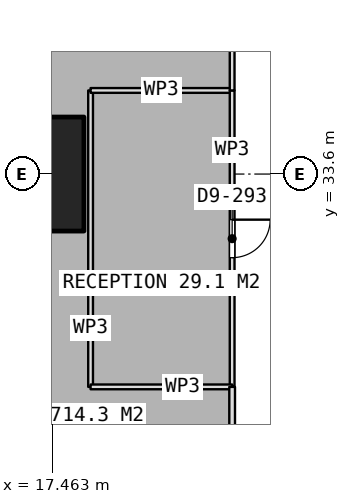
"""IFC4 building model, lengths in metres.
Left out: names, types, materials, properties, quantities, classifications, styles, units other than length and angle.
Written with IfcOpenShell. Run it as: python <this file> out.ifc"""

import sys

from ifc_helpers import new_model, si_unit, direction, frame, frame_2d, origin, origin_2d, place, context, subcontext, project, spatial, rectangle, extrude, element, fill, save


model = new_model("IFC4")
c1 = context("Model", 3, precision=1e-05, world=origin(), true_north=direction((0.0, 1.0)))
c2 = subcontext(c1, "Body", "Model", "MODEL_VIEW")
j1 = project(units=[si_unit("LENGTHUNIT", "METRE"), si_unit("PLANEANGLEUNIT", "RADIAN")], contexts=[c1])
p1 = place(None, origin())
s1 = spatial("IfcSite", under=j1, at=p1, CompositionType="ELEMENT")
p2 = place(p1, origin())
s2 = spatial("IfcBuilding", under=s1, at=p2, CompositionType="ELEMENT")
p3 = place(p2, frame((0.0, 0.0, 81.65)))
s3 = spatial("IfcBuildingStorey", under=s2, at=p3, CompositionType="ELEMENT", Elevation=81.65)
p4 = place(p3, frame((16.8, 33.6, 0.0), z_axis=(0.0, 0.0, 1.0), x_axis=(1.0, 0.0, 0.0)))
e1 = element("IfcColumn", 1, at=p4, inside=s3, PredefinedType="COLUMN", context=c2, shape_type="SweptSolid", body=[
    extrude(rectangle(XDim=3.0, YDim=3.0, at=origin_2d()), origin(), (0.0, 0.0, 1.0), 3.75),
])
p5 = place(p3, frame((18.475, 28.0, 0.0), z_axis=(0.0, 0.0, 1.0), x_axis=(0.0, 1.0, 0.0)))
e2 = element("IfcWall", 2, at=p5, inside=s3, PredefinedType="PARTITIONING", context=c2, shape_type="SweptSolid", body=[
    extrude(rectangle(XDim=7.8, YDim=0.125, at=frame_2d((3.9, 0.0))), origin(), (0.0, 0.0, 1.0), 3.4),
])
p6 = place(p3, frame((18.475, 35.8, 0.0), z_axis=(0.0, 0.0, 1.0), x_axis=(1.0, 0.0, 0.0)))
e3 = element("IfcWall", 3, at=p6, inside=s3, PredefinedType="PARTITIONING", context=c2, shape_type="SweptSolid", body=[
    extrude(rectangle(XDim=3.725, YDim=0.125, at=frame_2d((1.862, 0.0))), origin(), (0.0, 0.0, 1.0), 3.4),
])
p7 = place(p3, frame((22.2, 35.8, 0.0), z_axis=(0.0, 0.0, 1.0), x_axis=(0.0, -1.0, 0.0)))
e4 = element("IfcWall", 4, at=p7, inside=s3, PredefinedType="PARTITIONING", context=c2, shape_type="SweptSolid", body=[
    extrude(rectangle(XDim=7.8, YDim=0.125, at=frame_2d((3.9, 0.0))), origin(), (0.0, 0.0, 1.0), 3.4),
])
p8 = place(p7, frame((3.4, 0.0, 0.0)))
e5 = element("IfcOpeningElement", 5, at=p8, cuts=e4, PredefinedType="OPENING", context=c2, shape_type="SweptSolid", body=[
    extrude(rectangle(XDim=1.0, YDim=2.1, at=frame_2d((0.5, 1.05))), frame((0.0, 0.073, 0.0), z_axis=(0.0, -1.0, 0.0), x_axis=(1.0, 0.0, 0.0)), (0.0, 0.0, 1.0), 0.145),
])
p9 = place(p3, frame((22.2, 28.0, 0.0), z_axis=(0.0, 0.0, 1.0), x_axis=(-1.0, 0.0, 0.0)))
e6 = element("IfcWall", 6, at=p9, inside=s3, PredefinedType="PARTITIONING", context=c2, shape_type="SweptSolid", body=[
    extrude(rectangle(XDim=3.725, YDim=0.125, at=frame_2d((1.862, 0.0))), origin(), (0.0, 0.0, 1.0), 3.4),
])
p10 = place(p3, frame((22.2, 39.1, 0.0), z_axis=(0.0, 0.0, 1.0), x_axis=(0.0, -1.0, 0.0)))
e7 = element("IfcWall", 7, at=p10, inside=s3, PredefinedType="PARTITIONING", context=c2, shape_type="SweptSolid", body=[
    extrude(rectangle(XDim=3.3, YDim=0.125, at=frame_2d((1.65, 0.0))), origin(), (0.0, 0.0, 1.0), 3.4),
])
p11 = place(p3, frame((22.2, 28.0, 0.0), z_axis=(0.0, 0.0, 1.0), x_axis=(0.0, -1.0, 0.0)))
e8 = element("IfcWall", 8, at=p11, inside=s3, PredefinedType="PARTITIONING", context=c2, shape_type="SweptSolid", body=[
    extrude(rectangle(XDim=14.2, YDim=0.15, at=frame_2d((7.1, 0.0))), origin(), (0.0, 0.0, 1.0), 3.4),
])
p12 = place(p8, origin())
e9 = element("IfcDoor", 9, at=p12, inside=s3, OperationType="SINGLE_SWING_LEFT", PredefinedType="DOOR", context=c2, shape_type="SweptSolid", body=[
    extrude(rectangle(XDim=1.0, YDim=2.1, at=frame_2d((0.5, 1.05))), frame((0.0, 0.025, 0.0), z_axis=(0.0, -1.0, 0.0), x_axis=(1.0, 0.0, 0.0)), (0.0, 0.0, 1.0), 0.05),
])
fill(e5, e9)
save(model, sys.argv[1])
